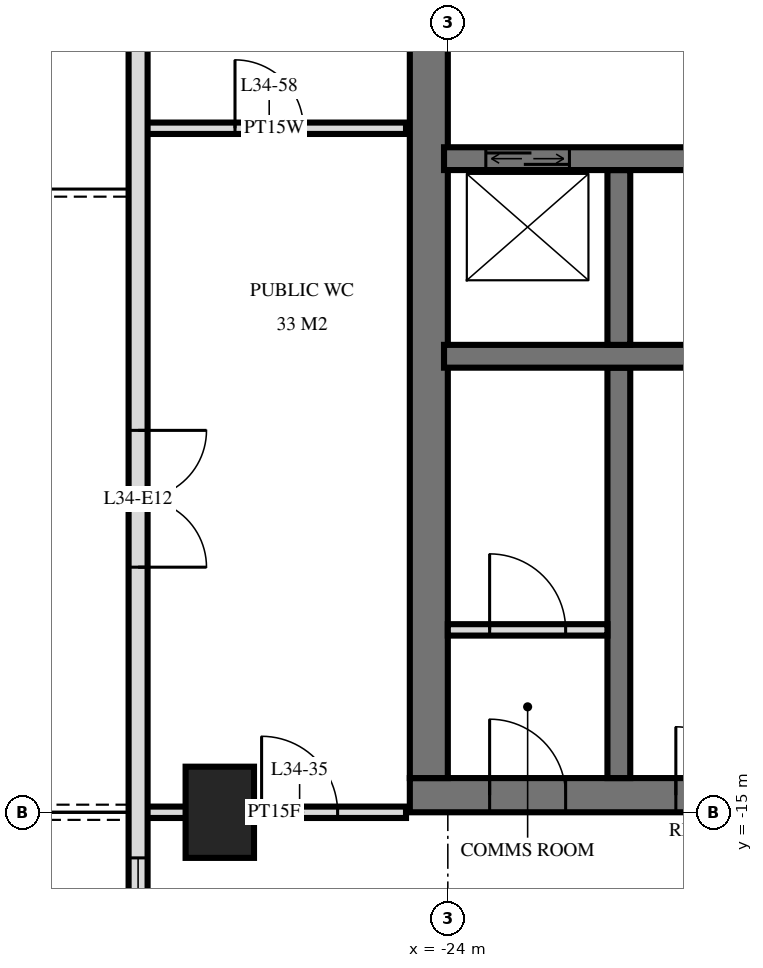
"""IFC4 building model, lengths in metres.
Left out: names, types, materials, properties, quantities, classifications, styles, units other than length and angle.
Written with IfcOpenShell. Run it as: python <this file> out.ifc"""

import sys

from ifc_helpers import new_model, si_unit, direction, frame, frame_2d, origin, origin_2d, place, context, subcontext, project, spatial, rectangle, extrude, element, fill, save


model = new_model("IFC4")
c1 = context("Model", 3, precision=1e-05, world=origin(), true_north=direction((0.0, 1.0)))
c2 = subcontext(c1, "Body", "Model", "MODEL_VIEW")
j1 = project(units=[si_unit("LENGTHUNIT", "METRE"), si_unit("PLANEANGLEUNIT", "RADIAN")], contexts=[c1])
p1 = place(None, origin())
s1 = spatial("IfcSite", under=j1, at=p1, CompositionType="ELEMENT")
p2 = place(p1, origin())
s2 = spatial("IfcBuilding", under=s1, at=p2, CompositionType="ELEMENT")
p3 = place(p2, frame((0.0, 0.0, 134.4)))
s3 = spatial("IfcBuildingStorey", under=s2, at=p3, CompositionType="ELEMENT", Elevation=134.4)
p4 = place(p3, frame((-27.0, -15.0, 0.0), z_axis=(0.0, 0.0, 1.0), x_axis=(0.0, 1.0, 0.0)))
e1 = element("IfcColumn", 1, at=p4, inside=s3, PredefinedType="COLUMN", context=c2, shape_type="SweptSolid", body=[
    extrude(rectangle(XDim=1.2, YDim=0.9, at=origin_2d()), origin(), (0.0, 0.0, 1.0), 3.6),
])
p5 = place(p3, frame((-24.5, -14.775, 0.0), z_axis=(0.0, 0.0, 1.0), x_axis=(1.0, 0.0, 0.0)))
e2 = element("IfcWall", 2, at=p5, inside=s3, PredefinedType="SHEAR", context=c2, shape_type="SweptSolid", body=[
    extrude(rectangle(XDim=14.5, YDim=0.45, at=frame_2d((7.25, 0.0))), origin(), (0.0, 0.0, 1.0), 3.6),
])
p6 = place(p5, frame((6.2, 0.0, 0.0)))
e3 = element("IfcOpeningElement", 3, at=p6, cuts=e2, PredefinedType="OPENING", context=c2, shape_type="SweptSolid", body=[
    extrude(rectangle(XDim=1.2, YDim=2.1, at=frame_2d((0.6, 1.05))), frame((0.0, 0.235, 0.0), z_axis=(0.0, -1.0, 0.0), x_axis=(1.0, 0.0, 0.0)), (0.0, 0.0, 1.0), 0.47),
])
p7 = place(p5, frame((9.25, 0.0, 0.0)))
e4 = element("IfcOpeningElement", 4, at=p7, cuts=e2, PredefinedType="OPENING", context=c2, shape_type="SweptSolid", body=[
    extrude(rectangle(XDim=1.1, YDim=2.1, at=frame_2d((0.55, 1.05))), frame((0.0, 0.235, 0.0), z_axis=(0.0, -1.0, 0.0), x_axis=(1.0, 0.0, 0.0)), (0.0, 0.0, 1.0), 0.47),
])
p8 = place(p5, frame((3.5, 0.0, 0.0)))
e5 = element("IfcOpeningElement", 5, at=p8, cuts=e2, PredefinedType="OPENING", context=c2, shape_type="SweptSolid", body=[
    extrude(rectangle(XDim=0.9, YDim=2.1, at=frame_2d((0.45, 1.05))), frame((0.0, 0.235, 0.0), z_axis=(0.0, -1.0, 0.0), x_axis=(1.0, 0.0, 0.0)), (0.0, 0.0, 1.0), 0.47),
])
p9 = place(p5, frame((1.05, 0.0, 0.0)))
e6 = element("IfcOpeningElement", 6, at=p9, cuts=e2, PredefinedType="OPENING", context=c2, shape_type="SweptSolid", body=[
    extrude(rectangle(XDim=1.0, YDim=2.1, at=frame_2d((0.5, 1.05))), frame((0.0, 0.235, 0.0), z_axis=(0.0, -1.0, 0.0), x_axis=(1.0, 0.0, 0.0)), (0.0, 0.0, 1.0), 0.47),
])
p10 = place(p3, frame((-24.25, -14.55, 0.0), z_axis=(0.0, 0.0, 1.0), x_axis=(0.0, 1.0, 0.0)))
e7 = element("IfcWall", 7, at=p10, inside=s3, PredefinedType="SHEAR", context=c2, shape_type="SweptSolid", body=[
    extrude(rectangle(XDim=14.1, YDim=0.5, at=frame_2d((7.05, 0.0))), origin(), (0.0, 0.0, 1.0), 3.6),
])
p11 = place(p3, frame((-24.05, -6.4, 0.0), z_axis=(0.0, 0.0, 1.0), x_axis=(1.0, 0.0, 0.0)))
e8 = element("IfcWall", 8, at=p11, inside=s3, PredefinedType="SHEAR", context=c2, shape_type="SweptSolid", body=[
    extrude(rectangle(XDim=13.7, YDim=0.3, at=frame_2d((6.85, 0.0))), origin(), (0.0, 0.0, 1.0), 3.6),
])
p12 = place(p11, frame((0.55, 0.0, 0.0)))
e9 = element("IfcOpeningElement", 9, at=p12, cuts=e8, PredefinedType="OPENING", context=c2, shape_type="SweptSolid", body=[
    extrude(rectangle(XDim=1.1, YDim=2.1, at=frame_2d((0.55, 1.05))), frame((0.0, 0.16, 0.0), z_axis=(0.0, -1.0, 0.0), x_axis=(1.0, 0.0, 0.0)), (0.0, 0.0, 1.0), 0.32),
])
p13 = place(p11, frame((5.8, 0.0, 0.0)))
e10 = element("IfcOpeningElement", 10, at=p13, cuts=e8, PredefinedType="OPENING", context=c2, shape_type="SweptSolid", body=[
    extrude(rectangle(XDim=1.1, YDim=2.1, at=frame_2d((0.55, 1.05))), frame((0.0, 0.16, 0.0), z_axis=(0.0, -1.0, 0.0), x_axis=(1.0, 0.0, 0.0)), (0.0, 0.0, 1.0), 0.32),
])
p14 = place(p3, frame((-24.05, -9.0, 0.0), z_axis=(0.0, 0.0, 1.0), x_axis=(1.0, 0.0, 0.0)))
e11 = element("IfcWall", 11, at=p14, inside=s3, PredefinedType="SHEAR", context=c2, shape_type="SweptSolid", body=[
    extrude(rectangle(XDim=13.7, YDim=0.3, at=frame_2d((6.85, 0.0))), origin(), (0.0, 0.0, 1.0), 3.6),
])
p15 = place(p14, frame((8.8, 0.0, 0.0)))
e12 = element("IfcOpeningElement", 12, at=p15, cuts=e11, PredefinedType="OPENING", context=c2, shape_type="SweptSolid", body=[
    extrude(rectangle(XDim=1.1, YDim=2.1, at=frame_2d((0.55, 1.05))), frame((0.0, 0.16, 0.0), z_axis=(0.0, -1.0, 0.0), x_axis=(1.0, 0.0, 0.0)), (0.0, 0.0, 1.0), 0.32),
])
p16 = place(p3, frame((-21.75, -8.85, 0.0), z_axis=(0.0, 0.0, 1.0), x_axis=(0.0, 1.0, 0.0)))
e13 = element("IfcWall", 13, at=p16, inside=s3, PredefinedType="SHEAR", context=c2, shape_type="SweptSolid", body=[
    extrude(rectangle(XDim=2.3, YDim=0.3, at=frame_2d((1.15, 0.0))), origin(), (0.0, 0.0, 1.0), 3.6),
])
p17 = place(p3, frame((-21.75, -14.55, 0.0), z_axis=(0.0, 0.0, 1.0), x_axis=(0.0, 1.0, 0.0)))
e14 = element("IfcWall", 14, at=p17, inside=s3, PredefinedType="SHEAR", context=c2, shape_type="SweptSolid", body=[
    extrude(rectangle(XDim=5.4, YDim=0.3, at=frame_2d((2.7, 0.0))), origin(), (0.0, 0.0, 1.0), 3.6),
])
p18 = place(p3, frame((-28.075, -3.325, 0.0), z_axis=(0.0, 0.0, 1.0), x_axis=(0.0, -1.0, 0.0)))
e15 = element("IfcWall", 15, at=p18, inside=s3, PredefinedType="SOLIDWALL", context=c2, shape_type="SweptSolid", body=[
    extrude(rectangle(XDim=25.951, YDim=0.25, at=frame_2d((12.975, 0.0))), origin(), (0.0, 0.0, 1.0), 3.32),
])
p19 = place(p18, frame((6.65, 0.0, 0.0)))
e16 = element("IfcOpeningElement", 16, at=p19, cuts=e15, PredefinedType="OPENING", context=c2, shape_type="SweptSolid", body=[
    extrude(rectangle(XDim=1.8, YDim=2.4, at=frame_2d((0.9, 1.2))), frame((0.0, 0.135, 0.0), z_axis=(0.0, -1.0, 0.0), x_axis=(1.0, 0.0, 0.0)), (0.0, 0.0, 1.0), 0.27),
])
p20 = place(p18, frame((12.275, 0.0, 0.3)))
e17 = element("IfcOpeningElement", 17, at=p20, cuts=e15, PredefinedType="OPENING", context=c2, shape_type="SweptSolid", body=[
    extrude(rectangle(XDim=1.2, YDim=2.1, at=frame_2d((0.6, 1.05))), frame((0.0, 0.135, 0.0), z_axis=(0.0, -1.0, 0.0), x_axis=(1.0, 0.0, 0.0)), (0.0, 0.0, 1.0), 0.27),
])
p21 = place(p18, frame((15.575, 0.0, 0.3)))
e18 = element("IfcOpeningElement", 18, at=p21, cuts=e15, PredefinedType="OPENING", context=c2, shape_type="SweptSolid", body=[
    extrude(rectangle(XDim=1.2, YDim=2.1, at=frame_2d((0.6, 1.05))), frame((0.0, 0.135, 0.0), z_axis=(0.0, -1.0, 0.0), x_axis=(1.0, 0.0, 0.0)), (0.0, 0.0, 1.0), 0.27),
])
p22 = place(p18, frame((18.175, 0.0, 0.0)))
e19 = element("IfcOpeningElement", 19, at=p22, cuts=e15, PredefinedType="OPENING", context=c2, shape_type="SweptSolid", body=[
    extrude(rectangle(XDim=1.8, YDim=2.4, at=frame_2d((0.9, 1.2))), frame((0.0, 0.135, 0.0), z_axis=(0.0, -1.0, 0.0), x_axis=(1.0, 0.0, 0.0)), (0.0, 0.0, 1.0), 0.27),
])
p23 = place(p18, frame((21.075, 0.0, 0.0)))
e20 = element("IfcOpeningElement", 20, at=p23, cuts=e15, PredefinedType="OPENING", context=c2, shape_type="SweptSolid", body=[
    extrude(rectangle(XDim=1.8, YDim=2.4, at=frame_2d((0.9, 1.2))), frame((0.0, 0.135, 0.0), z_axis=(0.0, -1.0, 0.0), x_axis=(1.0, 0.0, 0.0)), (0.0, 0.0, 1.0), 0.27),
])
p24 = place(p18, frame((23.825, 0.0, 0.3)))
e21 = element("IfcOpeningElement", 21, at=p24, cuts=e15, PredefinedType="OPENING", context=c2, shape_type="SweptSolid", body=[
    extrude(rectangle(XDim=1.8, YDim=2.1, at=frame_2d((0.9, 1.05))), frame((0.0, 0.135, 0.0), z_axis=(0.0, -1.0, 0.0), x_axis=(1.0, 0.0, 0.0)), (0.0, 0.0, 1.0), 0.27),
])
p25 = place(p3, frame((-24.0, -12.6, 0.0), z_axis=(0.0, 0.0, 1.0), x_axis=(1.0, 0.0, 0.0)))
e22 = element("IfcWall", 22, at=p25, inside=s3, PredefinedType="PARTITIONING", context=c2, shape_type="SweptSolid", body=[
    extrude(rectangle(XDim=2.1, YDim=0.15, at=frame_2d((1.05, 0.0))), origin(), (0.0, 0.0, 1.0), 3.3),
])
p26 = place(p25, frame((0.55, 0.0, 0.0)))
e23 = element("IfcOpeningElement", 23, at=p26, cuts=e22, PredefinedType="OPENING", context=c2, shape_type="SweptSolid", body=[
    extrude(rectangle(XDim=1.0, YDim=2.1, at=frame_2d((0.5, 1.05))), frame((0.0, 0.085, 0.0), z_axis=(0.0, -1.0, 0.0), x_axis=(1.0, 0.0, 0.0)), (0.0, 0.0, 1.0), 0.17),
])
p27 = place(p3, frame((-28.02, -15.0, 0.0), z_axis=(0.0, 0.0, 1.0), x_axis=(1.0, 0.0, 0.0)))
e24 = element("IfcWall", 24, at=p27, inside=s3, PredefinedType="PARTITIONING", context=c2, shape_type="SweptSolid", body=[
    extrude(rectangle(XDim=3.47, YDim=0.15, at=frame_2d((1.735, 0.0))), origin(), (0.0, 0.0, 1.0), 3.32),
])
p28 = place(p27, frame((1.57, 0.0, 0.0)))
e25 = element("IfcOpeningElement", 25, at=p28, cuts=e24, PredefinedType="OPENING", context=c2, shape_type="SweptSolid", body=[
    extrude(rectangle(XDim=1.0, YDim=2.1, at=frame_2d((0.5, 1.05))), frame((0.0, 0.085, 0.0), z_axis=(0.0, -1.0, 0.0), x_axis=(1.0, 0.0, 0.0)), (0.0, 0.0, 1.0), 0.17),
])
p29 = place(p3, frame((-28.02, -6.0, 0.0), z_axis=(0.0, 0.0, 1.0), x_axis=(1.0, 0.0, 0.0)))
e26 = element("IfcWall", 26, at=p29, inside=s3, PredefinedType="PLUMBINGWALL", context=c2, shape_type="SweptSolid", body=[
    extrude(rectangle(XDim=3.47, YDim=0.15, at=frame_2d((1.735, 0.0))), origin(), (0.0, 0.0, 1.0), 3.32),
])
p30 = place(p29, frame((1.22, 0.0, 0.0)))
e27 = element("IfcOpeningElement", 27, at=p30, cuts=e26, PredefinedType="OPENING", context=c2, shape_type="SweptSolid", body=[
    extrude(rectangle(XDim=0.9, YDim=2.1, at=frame_2d((0.45, 1.05))), frame((0.0, 0.085, 0.0), z_axis=(0.0, -1.0, 0.0), x_axis=(1.0, 0.0, 0.0)), (0.0, 0.0, 1.0), 0.17),
])
p31 = place(p19, origin())
e28 = element("IfcDoor", 28, at=p31, inside=s3, OperationType="DOUBLE_DOOR_SINGLE_SWING", PredefinedType="DOOR", context=c2, shape_type="SweptSolid", body=[
    extrude(rectangle(XDim=1.8, YDim=2.4, at=frame_2d((0.9, 1.2))), frame((0.0, 0.025, 0.0), z_axis=(0.0, -1.0, 0.0), x_axis=(1.0, 0.0, 0.0)), (0.0, 0.0, 1.0), 0.05),
])
fill(e16, e28)
p32 = place(p20, origin())
e29 = element("IfcWindow", 29, at=p32, inside=s3, PartitioningType="SINGLE_PANEL", PredefinedType="WINDOW", context=c2, shape_type="SweptSolid", body=[
    extrude(rectangle(XDim=1.2, YDim=2.1, at=frame_2d((0.6, 1.05))), frame((0.0, 0.03, 0.0), z_axis=(0.0, -1.0, 0.0), x_axis=(1.0, 0.0, 0.0)), (0.0, 0.0, 1.0), 0.06),
])
fill(e17, e29)
p33 = place(p12, origin())
e30 = element("IfcDoor", 30, at=p33, inside=s3, OperationType="DOUBLE_DOOR_SLIDING", PredefinedType="USERDEFINED", context=c2, shape_type="SweptSolid", body=[
    extrude(rectangle(XDim=1.1, YDim=2.1, at=frame_2d((0.55, 1.05))), frame((0.0, 0.025, 0.0), z_axis=(0.0, -1.0, 0.0), x_axis=(1.0, 0.0, 0.0)), (0.0, 0.0, 1.0), 0.05),
])
fill(e9, e30)
p34 = place(p8, origin())
e31 = element("IfcDoor", 31, at=p34, inside=s3, OperationType="SINGLE_SWING_RIGHT", PredefinedType="DOOR", context=c2, shape_type="SweptSolid", body=[
    extrude(rectangle(XDim=0.9, YDim=2.1, at=frame_2d((0.45, 1.05))), frame((0.0, 0.025, 0.0), z_axis=(0.0, -1.0, 0.0), x_axis=(1.0, 0.0, 0.0)), (0.0, 0.0, 1.0), 0.05),
])
fill(e5, e31)
p35 = place(p9, origin())
e32 = element("IfcDoor", 32, at=p35, inside=s3, OperationType="SINGLE_SWING_RIGHT", PredefinedType="DOOR", context=c2, shape_type="SweptSolid", body=[
    extrude(rectangle(XDim=1.0, YDim=2.1, at=frame_2d((0.5, 1.05))), frame((0.0, 0.025, 0.0), z_axis=(0.0, -1.0, 0.0), x_axis=(1.0, 0.0, 0.0)), (0.0, 0.0, 1.0), 0.05),
])
fill(e6, e32)
p36 = place(p26, origin())
e33 = element("IfcDoor", 33, at=p36, inside=s3, OperationType="SINGLE_SWING_RIGHT", PredefinedType="DOOR", context=c2, shape_type="SweptSolid", body=[
    extrude(rectangle(XDim=1.0, YDim=2.1, at=frame_2d((0.5, 1.05))), frame((0.0, 0.025, 0.0), z_axis=(0.0, -1.0, 0.0), x_axis=(1.0, 0.0, 0.0)), (0.0, 0.0, 1.0), 0.05),
])
fill(e23, e33)
p37 = place(p28, origin())
e34 = element("IfcDoor", 34, at=p37, inside=s3, OperationType="SINGLE_SWING_RIGHT", PredefinedType="DOOR", context=c2, shape_type="SweptSolid", body=[
    extrude(rectangle(XDim=1.0, YDim=2.1, at=frame_2d((0.5, 1.05))), frame((0.0, 0.025, 0.0), z_axis=(0.0, -1.0, 0.0), x_axis=(1.0, 0.0, 0.0)), (0.0, 0.0, 1.0), 0.05),
])
fill(e25, e34)
p38 = place(p30, origin())
e35 = element("IfcDoor", 35, at=p38, inside=s3, OperationType="SINGLE_SWING_RIGHT", PredefinedType="DOOR", context=c2, shape_type="SweptSolid", body=[
    extrude(rectangle(XDim=0.9, YDim=2.1, at=frame_2d((0.45, 1.05))), frame((0.0, 0.025, 0.0), z_axis=(0.0, -1.0, 0.0), x_axis=(1.0, 0.0, 0.0)), (0.0, 0.0, 1.0), 0.05),
])
fill(e27, e35)
save(model, sys.argv[1])
